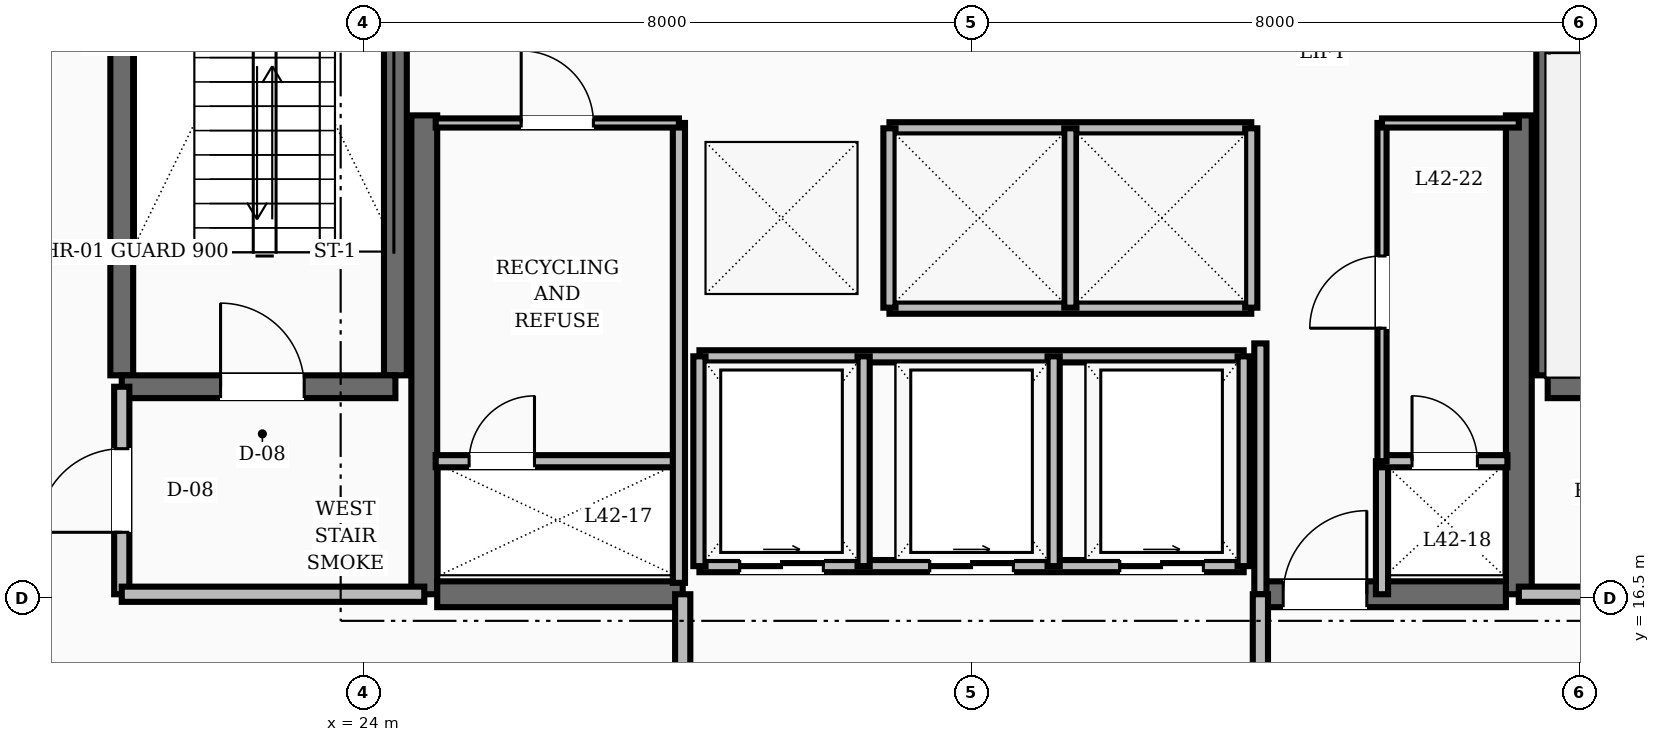
"""IFC4 building model, lengths in metres.
Left out: names, types, materials, properties, quantities, classifications, styles, units other than length and angle.
Written with IfcOpenShell. Run it as: python <this file> out.ifc"""

import sys

from ifc_helpers import new_model, si_unit, direction, frame, frame_2d, origin, place, context, subcontext, project, spatial, rectangle, extrude, element, fill, save


model = new_model("IFC4")
c1 = context("Model", 3, precision=1e-05, world=origin(), true_north=direction((0.0, 1.0)))
c2 = subcontext(c1, "Body", "Model", "MODEL_VIEW")
j1 = project(units=[si_unit("LENGTHUNIT", "METRE"), si_unit("PLANEANGLEUNIT", "RADIAN")], contexts=[c1])
p1 = place(None, origin())
s1 = spatial("IfcSite", under=j1, at=p1, CompositionType="ELEMENT")
p2 = place(p1, origin())
s2 = spatial("IfcBuilding", under=s1, at=p2, CompositionType="ELEMENT")
p3 = place(p2, frame((0.0, 0.0, 164.0)))
s3 = spatial("IfcBuildingStorey", under=s2, at=p3, CompositionType="ELEMENT", Elevation=164.0)
for number, where, z_axis, x_axis in (
    (1, (24.8, 16.55, 0.0), (0.0, 0.0, 1.0), (0.0, 1.0, 0.0)),
    (2, (39.2, 16.55, 0.0), (0.0, 0.0, 1.0), (0.0, 1.0, 0.0)),
):
    element("IfcWall", number, at=place(p3, frame(where, z_axis=z_axis, x_axis=x_axis)), inside=s3, PredefinedType="SHEAR", context=c2, shape_type="SweptSolid", body=[
        extrude(rectangle(XDim=6.3, YDim=0.34, at=frame_2d((3.15, 0.0))), origin(), (0.0, 0.0, 1.0), 3.6),
    ])
p4 = place(p3, frame((24.97, 16.55, 0.0), z_axis=(0.0, 0.0, 1.0), x_axis=(1.0, 0.0, 0.0)))
e3 = element("IfcWall", 3, at=p4, inside=s3, PredefinedType="SHEAR", context=c2, shape_type="SweptSolid", body=[
    extrude(rectangle(XDim=3.23, YDim=0.34, at=frame_2d((1.615, 0.0))), origin(), (0.0, 0.0, 1.0), 3.6),
])
p5 = place(p3, frame((35.8, 16.55, 0.0), z_axis=(0.0, 0.0, 1.0), x_axis=(1.0, 0.0, 0.0)))
e4 = element("IfcWall", 4, at=p5, inside=s3, PredefinedType="SHEAR", context=c2, shape_type="SweptSolid", body=[
    extrude(rectangle(XDim=3.23, YDim=0.34, at=frame_2d((1.615, 0.0))), origin(), (0.0, 0.0, 1.0), 3.6),
])
p6 = place(p5, frame((0.3, 0.0, 0.0)))
e5 = element("IfcOpeningElement", 5, at=p6, cuts=e4, PredefinedType="OPENING", context=c2, shape_type="SweptSolid", body=[
    extrude(rectangle(XDim=1.1, YDim=2.1, at=frame_2d((0.55, 1.05))), frame((0.0, 0.18, 0.0), z_axis=(0.0, -1.0, 0.0), x_axis=(1.0, 0.0, 0.0)), (0.0, 0.0, 1.0), 0.36),
])
for number, where, z_axis, x_axis in (
    (6, (20.82, 19.43, 0.0), (0.0, 0.0, 1.0), (0.0, 1.0, 0.0)),
    (7, (24.42, 19.43, 0.0), (0.0, 0.0, 1.0), (0.0, 1.0, 0.0)),
):
    element("IfcWall", number, at=place(p3, frame(where, z_axis=z_axis, x_axis=x_axis)), inside=s3, PredefinedType="SHEAR", context=c2, shape_type="SweptSolid", body=[
        extrude(rectangle(XDim=8.74, YDim=0.3, at=frame_2d((4.37, 0.0))), origin(), (0.0, 0.0, 1.0), 3.6),
    ])
p7 = place(p3, frame((20.82, 19.28, 0.0), z_axis=(0.0, 0.0, 1.0), x_axis=(1.0, 0.0, 0.0)))
e8 = element("IfcWall", 8, at=p7, inside=s3, PredefinedType="SHEAR", context=c2, shape_type="SweptSolid", body=[
    extrude(rectangle(XDim=3.6, YDim=0.3, at=frame_2d((1.8, 0.0))), origin(), (0.0, 0.0, 1.0), 3.6),
])
p8 = place(p7, frame((1.3, 0.0, 0.0)))
e9 = element("IfcOpeningElement", 9, at=p8, cuts=e8, PredefinedType="OPENING", context=c2, shape_type="SweptSolid", body=[
    extrude(rectangle(XDim=1.1, YDim=2.1, at=frame_2d((0.55, 1.05))), frame((0.0, 0.16, 0.0), z_axis=(0.0, -1.0, 0.0), x_axis=(1.0, 0.0, 0.0)), (0.0, 0.0, 1.0), 0.32),
])
p9 = place(p3, frame((39.58, 19.43, 0.0), z_axis=(0.0, 0.0, 1.0), x_axis=(0.0, 1.0, 0.0)))
e10 = element("IfcWall", 10, at=p9, inside=s3, PredefinedType="SHEAR", context=c2, shape_type="SweptSolid", body=[
    extrude(rectangle(XDim=8.74, YDim=0.3, at=frame_2d((4.37, 0.0))), origin(), (0.0, 0.0, 1.0), 3.6),
])
p10 = place(p3, frame((39.58, 19.28, 0.0), z_axis=(0.0, 0.0, 1.0), x_axis=(1.0, 0.0, 0.0)))
e11 = element("IfcWall", 11, at=p10, inside=s3, PredefinedType="SHEAR", context=c2, shape_type="SweptSolid", body=[
    extrude(rectangle(XDim=3.6, YDim=0.3, at=frame_2d((1.8, 0.0))), origin(), (0.0, 0.0, 1.0), 3.6),
])
p11 = place(p3, frame((20.82, 16.55, 0.0), z_axis=(0.0, 0.0, 1.0), x_axis=(0.0, 1.0, 0.0)))
e12 = element("IfcWall", 12, at=p11, inside=s3, PredefinedType="SOLIDWALL", context=c2, shape_type="SweptSolid", body=[
    extrude(rectangle(XDim=2.73, YDim=0.2, at=frame_2d((1.365, 0.0))), origin(), (0.0, 0.0, 1.0), 2.8),
])
p12 = place(p11, frame((0.815, 0.0, 0.0)))
e13 = element("IfcOpeningElement", 13, at=p12, cuts=e12, PredefinedType="OPENING", context=c2, shape_type="SweptSolid", body=[
    extrude(rectangle(XDim=1.1, YDim=2.1, at=frame_2d((0.55, 1.05))), frame((0.0, 0.11, 0.0), z_axis=(0.0, -1.0, 0.0), x_axis=(1.0, 0.0, 0.0)), (0.0, 0.0, 1.0), 0.22),
])
for number, where, z_axis, x_axis in (
    (14, (20.82, 16.55, 0.0), (0.0, 0.0, 1.0), (1.0, 0.0, 0.0)),
    (15, (39.2, 16.55, 0.0), (0.0, 0.0, 1.0), (1.0, 0.0, 0.0)),
):
    element("IfcWall", number, at=place(p3, frame(where, z_axis=z_axis, x_axis=x_axis)), inside=s3, PredefinedType="SOLIDWALL", context=c2, shape_type="SweptSolid", body=[
        extrude(rectangle(XDim=3.98, YDim=0.2, at=frame_2d((1.99, 0.0))), origin(), (0.0, 0.0, 1.0), 2.8),
    ])
p13 = place(p3, frame((35.8, 16.55, 0.0), z_axis=(0.0, 0.0, 1.0), x_axis=(0.0, 1.0, 0.0)))
e16 = element("IfcWall", 16, at=p13, inside=s3, PredefinedType="SOLIDWALL", context=c2, shape_type="SweptSolid", body=[
    extrude(rectangle(XDim=3.3, YDim=0.16, at=frame_2d((1.65, 0.0))), origin(), (0.0, 0.0, 1.0), 2.8),
])
p14 = place(p3, frame((37.4, 16.55, 0.0), z_axis=(0.0, 0.0, 1.0), x_axis=(0.0, 1.0, 0.0)))
e17 = element("IfcWall", 17, at=p14, inside=s3, PredefinedType="SOLIDWALL", context=c2, shape_type="SweptSolid", body=[
    extrude(rectangle(XDim=1.75, YDim=0.16, at=frame_2d((0.875, 0.0))), origin(), (0.0, 0.0, 1.0), 2.8),
])
for number, where, z_axis, x_axis in (
    (18, (28.2, 14.35, 0.0), (0.0, 0.0, 1.0), (0.0, 1.0, 0.0)),
    (19, (35.8, 14.35, 0.0), (0.0, 0.0, 1.0), (0.0, 1.0, 0.0)),
):
    element("IfcWall", number, at=place(p3, frame(where, z_axis=z_axis, x_axis=x_axis)), inside=s3, PredefinedType="SOLIDWALL", context=c2, shape_type="SweptSolid", body=[
        extrude(rectangle(XDim=2.2, YDim=0.2, at=frame_2d((1.1, 0.0))), origin(), (0.0, 0.0, 1.0), 2.8),
    ])
for number, where, z_axis, x_axis in (
    (20, (30.92, 22.68, 0.0), (0.0, 0.0, 1.0), (1.0, 0.0, 0.0)),
    (21, (30.92, 20.32, 0.0), (0.0, 0.0, 1.0), (1.0, 0.0, 0.0)),
):
    element("IfcWall", number, at=place(p3, frame(where, z_axis=z_axis, x_axis=x_axis)), inside=s3, PredefinedType="SOLIDWALL", context=c2, shape_type="SweptSolid", body=[
        extrude(rectangle(XDim=4.76, YDim=0.16, at=frame_2d((2.38, 0.0))), origin(), (0.0, 0.0, 1.0), 2.8),
    ])
for number, where, z_axis, x_axis in (
    (22, (30.92, 20.32, 0.0), (0.0, 0.0, 1.0), (0.0, 1.0, 0.0)),
    (23, (33.3, 20.32, 0.0), (0.0, 0.0, 1.0), (0.0, 1.0, 0.0)),
    (24, (35.68, 20.32, 0.0), (0.0, 0.0, 1.0), (0.0, 1.0, 0.0)),
):
    element("IfcWall", number, at=place(p3, frame(where, z_axis=z_axis, x_axis=x_axis)), inside=s3, PredefinedType="SOLIDWALL", context=c2, shape_type="SweptSolid", body=[
        extrude(rectangle(XDim=2.36, YDim=0.16, at=frame_2d((1.18, 0.0))), origin(), (0.0, 0.0, 1.0), 2.8),
    ])
p15 = place(p3, frame((28.42, 16.92, 0.0), z_axis=(0.0, 0.0, 1.0), x_axis=(1.0, 0.0, 0.0)))
e25 = element("IfcWall", 25, at=p15, inside=s3, PredefinedType="SOLIDWALL", context=c2, shape_type="SweptSolid", body=[
    extrude(rectangle(XDim=7.16, YDim=0.16, at=frame_2d((3.58, 0.0))), origin(), (0.0, 0.0, 1.0), 2.8),
])
p16 = place(p15, frame((0.53, 0.0, 0.0)))
e26 = element("IfcOpeningElement", 26, at=p16, cuts=e25, PredefinedType="OPENING", context=c2, shape_type="SweptSolid", body=[
    extrude(rectangle(XDim=1.1, YDim=2.15, at=frame_2d((0.55, 1.075))), frame((0.0, 0.09, 0.0), z_axis=(0.0, -1.0, 0.0), x_axis=(1.0, 0.0, 0.0)), (0.0, 0.0, 1.0), 0.18),
])
p17 = place(p15, frame((3.03, 0.0, 0.0)))
e27 = element("IfcOpeningElement", 27, at=p17, cuts=e25, PredefinedType="OPENING", context=c2, shape_type="SweptSolid", body=[
    extrude(rectangle(XDim=1.1, YDim=2.15, at=frame_2d((0.55, 1.075))), frame((0.0, 0.09, 0.0), z_axis=(0.0, -1.0, 0.0), x_axis=(1.0, 0.0, 0.0)), (0.0, 0.0, 1.0), 0.18),
])
p18 = place(p15, frame((5.53, 0.0, 0.0)))
e28 = element("IfcOpeningElement", 28, at=p18, cuts=e25, PredefinedType="OPENING", context=c2, shape_type="SweptSolid", body=[
    extrude(rectangle(XDim=1.1, YDim=2.15, at=frame_2d((0.55, 1.075))), frame((0.0, 0.09, 0.0), z_axis=(0.0, -1.0, 0.0), x_axis=(1.0, 0.0, 0.0)), (0.0, 0.0, 1.0), 0.18),
])
p19 = place(p3, frame((28.42, 19.68, 0.0), z_axis=(0.0, 0.0, 1.0), x_axis=(1.0, 0.0, 0.0)))
e29 = element("IfcWall", 29, at=p19, inside=s3, PredefinedType="SOLIDWALL", context=c2, shape_type="SweptSolid", body=[
    extrude(rectangle(XDim=7.16, YDim=0.16, at=frame_2d((3.58, 0.0))), origin(), (0.0, 0.0, 1.0), 2.8),
])
for number, where, z_axis, x_axis in (
    (30, (28.42, 16.92, 0.0), (0.0, 0.0, 1.0), (0.0, 1.0, 0.0)),
    (31, (30.58, 16.92, 0.0), (0.0, 0.0, 1.0), (0.0, 1.0, 0.0)),
    (32, (33.08, 16.92, 0.0), (0.0, 0.0, 1.0), (0.0, 1.0, 0.0)),
    (33, (35.58, 16.92, 0.0), (0.0, 0.0, 1.0), (0.0, 1.0, 0.0)),
):
    element("IfcWall", number, at=place(p3, frame(where, z_axis=z_axis, x_axis=x_axis)), inside=s3, PredefinedType="SOLIDWALL", context=c2, shape_type="SweptSolid", body=[
        extrude(rectangle(XDim=2.76, YDim=0.16, at=frame_2d((1.38, 0.0))), origin(), (0.0, 0.0, 1.0), 2.8),
    ])
p20 = place(p3, frame((24.95, 18.3, 0.0), z_axis=(0.0, 0.0, 1.0), x_axis=(1.0, 0.0, 0.0)))
e34 = element("IfcWall", 34, at=p20, inside=s3, PredefinedType="SOLIDWALL", context=c2, shape_type="SweptSolid", body=[
    extrude(rectangle(XDim=3.2, YDim=0.16, at=frame_2d((1.6, 0.0))), origin(), (0.0, 0.0, 1.0), 2.8),
])
p21 = place(p20, frame((0.44, 0.0, 0.0)))
e35 = element("IfcOpeningElement", 35, at=p21, cuts=e34, PredefinedType="OPENING", context=c2, shape_type="SweptSolid", body=[
    extrude(rectangle(XDim=0.86, YDim=2.05, at=frame_2d((0.43, 1.025))), frame((0.0, 0.09, 0.0), z_axis=(0.0, -1.0, 0.0), x_axis=(1.0, 0.0, 0.0)), (0.0, 0.0, 1.0), 0.18),
])
p22 = place(p3, frame((28.15, 16.7, 0.0), z_axis=(0.0, 0.0, 1.0), x_axis=(0.0, 1.0, 0.0)))
e36 = element("IfcWall", 36, at=p22, inside=s3, PredefinedType="SOLIDWALL", context=c2, shape_type="SweptSolid", body=[
    extrude(rectangle(XDim=6.05, YDim=0.16, at=frame_2d((3.025, 0.0))), origin(), (0.0, 0.0, 1.0), 2.8),
])
p23 = place(p3, frame((37.4, 18.3, 0.0), z_axis=(0.0, 0.0, 1.0), x_axis=(1.0, 0.0, 0.0)))
e37 = element("IfcWall", 37, at=p23, inside=s3, PredefinedType="SOLIDWALL", context=c2, shape_type="SweptSolid", body=[
    extrude(rectangle(XDim=1.65, YDim=0.16, at=frame_2d((0.825, 0.0))), origin(), (0.0, 0.0, 1.0), 2.8),
])
p24 = place(p23, frame((0.395, 0.0, 0.0)))
e38 = element("IfcOpeningElement", 38, at=p24, cuts=e37, PredefinedType="OPENING", context=c2, shape_type="SweptSolid", body=[
    extrude(rectangle(XDim=0.86, YDim=2.1, at=frame_2d((0.43, 1.05))), frame((0.0, 0.09, 0.0), z_axis=(0.0, -1.0, 0.0), x_axis=(1.0, 0.0, 0.0)), (0.0, 0.0, 1.0), 0.18),
])
p25 = place(p3, frame((24.95, 22.75, 0.0), z_axis=(0.0, 0.0, 1.0), x_axis=(1.0, 0.0, 0.0)))
e39 = element("IfcWall", 39, at=p25, inside=s3, PredefinedType="PARTITIONING", context=c2, shape_type="SweptSolid", body=[
    extrude(rectangle(XDim=3.2, YDim=0.12, at=frame_2d((1.6, 0.0))), origin(), (0.0, 0.0, 1.0), 2.8),
])
p26 = place(p25, frame((1.125, 0.0, 0.0)))
e40 = element("IfcOpeningElement", 40, at=p26, cuts=e39, PredefinedType="OPENING", context=c2, shape_type="SweptSolid", body=[
    extrude(rectangle(XDim=0.95, YDim=2.1, at=frame_2d((0.475, 1.05))), frame((0.0, 0.07, 0.0), z_axis=(0.0, -1.0, 0.0), x_axis=(1.0, 0.0, 0.0)), (0.0, 0.0, 1.0), 0.14),
])
p27 = place(p3, frame((37.4, 18.3, 0.0), z_axis=(0.0, 0.0, 1.0), x_axis=(0.0, 1.0, 0.0)))
e41 = element("IfcWall", 41, at=p27, inside=s3, PredefinedType="PARTITIONING", context=c2, shape_type="SweptSolid", body=[
    extrude(rectangle(XDim=4.45, YDim=0.12, at=frame_2d((2.225, 0.0))), origin(), (0.0, 0.0, 1.0), 2.8),
])
p28 = place(p27, frame((1.75, 0.0, 0.0)))
e42 = element("IfcOpeningElement", 42, at=p28, cuts=e41, PredefinedType="OPENING", context=c2, shape_type="SweptSolid", body=[
    extrude(rectangle(XDim=0.95, YDim=2.1, at=frame_2d((0.475, 1.05))), frame((0.0, 0.07, 0.0), z_axis=(0.0, -1.0, 0.0), x_axis=(1.0, 0.0, 0.0)), (0.0, 0.0, 1.0), 0.14),
])
p29 = place(p3, frame((37.4, 22.75, 0.0), z_axis=(0.0, 0.0, 1.0), x_axis=(1.0, 0.0, 0.0)))
e43 = element("IfcWall", 43, at=p29, inside=s3, PredefinedType="PARTITIONING", context=c2, shape_type="SweptSolid", body=[
    extrude(rectangle(XDim=1.8, YDim=0.12, at=frame_2d((0.9, 0.0))), origin(), (0.0, 0.0, 1.0), 2.8),
])
p30 = place(p8, origin())
e44 = element("IfcDoor", 44, at=p30, inside=s3, OperationType="SINGLE_SWING_LEFT", PredefinedType="DOOR", context=c2, shape_type="SweptSolid", body=[
    extrude(rectangle(XDim=1.1, YDim=2.1, at=frame_2d((0.55, 1.05))), frame((0.0, 0.025, 0.0), z_axis=(0.0, -1.0, 0.0), x_axis=(1.0, 0.0, 0.0)), (0.0, 0.0, 1.0), 0.05),
])
fill(e9, e44)
p31 = place(p12, origin())
e45 = element("IfcDoor", 45, at=p31, inside=s3, OperationType="SINGLE_SWING_LEFT", PredefinedType="DOOR", context=c2, shape_type="SweptSolid", body=[
    extrude(rectangle(XDim=1.1, YDim=2.1, at=frame_2d((0.55, 1.05))), frame((0.0, 0.025, 0.0), z_axis=(0.0, -1.0, 0.0), x_axis=(1.0, 0.0, 0.0)), (0.0, 0.0, 1.0), 0.05),
])
fill(e13, e45)
p32 = place(p6, origin())
e46 = element("IfcDoor", 46, at=p32, inside=s3, OperationType="SINGLE_SWING_RIGHT", PredefinedType="DOOR", context=c2, shape_type="SweptSolid", body=[
    extrude(rectangle(XDim=1.1, YDim=2.1, at=frame_2d((0.55, 1.05))), frame((0.0, 0.025, 0.0), z_axis=(0.0, -1.0, 0.0), x_axis=(1.0, 0.0, 0.0)), (0.0, 0.0, 1.0), 0.05),
])
fill(e5, e46)
p33 = place(p16, origin())
e47 = element("IfcDoor", 47, at=p33, inside=s3, OperationType="SLIDING_TO_RIGHT", PredefinedType="DOOR", context=c2, shape_type="SweptSolid", body=[
    extrude(rectangle(XDim=1.1, YDim=2.15, at=frame_2d((0.55, 1.075))), frame((0.0, 0.025, 0.0), z_axis=(0.0, -1.0, 0.0), x_axis=(1.0, 0.0, 0.0)), (0.0, 0.0, 1.0), 0.05),
])
fill(e26, e47)
p34 = place(p17, origin())
e48 = element("IfcDoor", 48, at=p34, inside=s3, OperationType="SLIDING_TO_RIGHT", PredefinedType="DOOR", context=c2, shape_type="SweptSolid", body=[
    extrude(rectangle(XDim=1.1, YDim=2.15, at=frame_2d((0.55, 1.075))), frame((0.0, 0.025, 0.0), z_axis=(0.0, -1.0, 0.0), x_axis=(1.0, 0.0, 0.0)), (0.0, 0.0, 1.0), 0.05),
])
fill(e27, e48)
p35 = place(p18, origin())
e49 = element("IfcDoor", 49, at=p35, inside=s3, OperationType="SLIDING_TO_RIGHT", PredefinedType="DOOR", context=c2, shape_type="SweptSolid", body=[
    extrude(rectangle(XDim=1.1, YDim=2.15, at=frame_2d((0.55, 1.075))), frame((0.0, 0.025, 0.0), z_axis=(0.0, -1.0, 0.0), x_axis=(1.0, 0.0, 0.0)), (0.0, 0.0, 1.0), 0.05),
])
fill(e28, e49)
p36 = place(p21, origin())
e50 = element("IfcDoor", 50, at=p36, inside=s3, OperationType="SINGLE_SWING_RIGHT", PredefinedType="TRAPDOOR", context=c2, shape_type="SweptSolid", body=[
    extrude(rectangle(XDim=0.86, YDim=2.05, at=frame_2d((0.43, 1.025))), frame((0.0, 0.025, 0.0), z_axis=(0.0, -1.0, 0.0), x_axis=(1.0, 0.0, 0.0)), (0.0, 0.0, 1.0), 0.05),
])
fill(e35, e50)
p37 = place(p24, origin())
e51 = element("IfcDoor", 51, at=p37, inside=s3, OperationType="SINGLE_SWING_LEFT", PredefinedType="TRAPDOOR", context=c2, shape_type="SweptSolid", body=[
    extrude(rectangle(XDim=0.86, YDim=2.1, at=frame_2d((0.43, 1.05))), frame((0.0, 0.025, 0.0), z_axis=(0.0, -1.0, 0.0), x_axis=(1.0, 0.0, 0.0)), (0.0, 0.0, 1.0), 0.05),
])
fill(e38, e51)
p38 = place(p26, origin())
e52 = element("IfcDoor", 52, at=p38, inside=s3, OperationType="SINGLE_SWING_LEFT", PredefinedType="DOOR", context=c2, shape_type="SweptSolid", body=[
    extrude(rectangle(XDim=0.95, YDim=2.1, at=frame_2d((0.475, 1.05))), frame((0.0, 0.025, 0.0), z_axis=(0.0, -1.0, 0.0), x_axis=(1.0, 0.0, 0.0)), (0.0, 0.0, 1.0), 0.05),
])
fill(e40, e52)
p39 = place(p28, origin())
e53 = element("IfcDoor", 53, at=p39, inside=s3, OperationType="SINGLE_SWING_LEFT", PredefinedType="DOOR", context=c2, shape_type="SweptSolid", body=[
    extrude(rectangle(XDim=0.95, YDim=2.1, at=frame_2d((0.475, 1.05))), frame((0.0, 0.025, 0.0), z_axis=(0.0, -1.0, 0.0), x_axis=(1.0, 0.0, 0.0)), (0.0, 0.0, 1.0), 0.05),
])
fill(e42, e53)
save(model, sys.argv[1])
